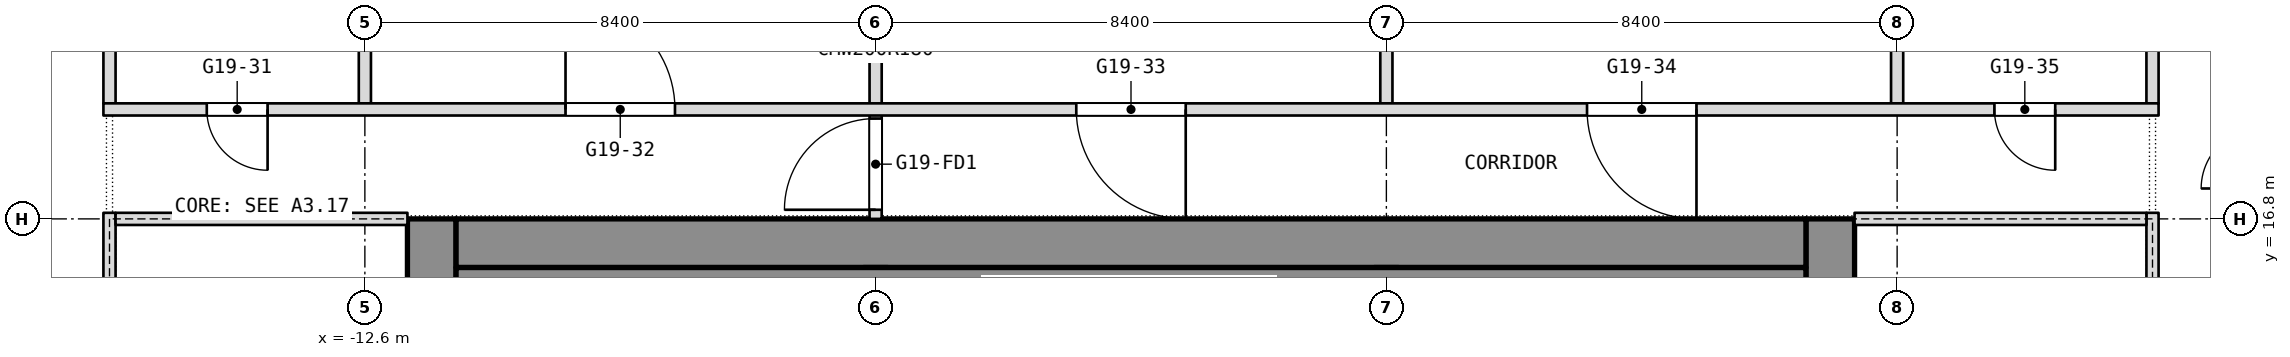
"""IFC4 building model, lengths in metres.
Left out: names, types, materials, properties, quantities, classifications, styles, units other than length and angle.
Written with IfcOpenShell. Run it as: python <this file> out.ifc"""

import sys

from ifc_helpers import new_model, si_unit, direction, frame, frame_2d, origin, place, context, subcontext, project, spatial, rectangle, extrude, element, fill, save


model = new_model("IFC4")
c1 = context("Model", 3, precision=1e-05, world=origin(), true_north=direction((0.0, 1.0)))
c2 = subcontext(c1, "Body", "Model", "MODEL_VIEW")
j1 = project(units=[si_unit("LENGTHUNIT", "METRE"), si_unit("PLANEANGLEUNIT", "RADIAN")], contexts=[c1])
p1 = place(None, origin())
s1 = spatial("IfcSite", under=j1, at=p1, CompositionType="ELEMENT")
p2 = place(p1, origin())
s2 = spatial("IfcBuilding", under=s1, at=p2, CompositionType="ELEMENT")
p3 = place(p2, frame((0.0, 0.0, 223.7)))
s3 = spatial("IfcBuildingStorey", under=s2, at=p3, CompositionType="ELEMENT", Elevation=223.7)
p4 = place(p3, frame((11.5, 0.0, 0.0), z_axis=(0.0, 0.0, 1.0), x_axis=(0.0, 1.0, 0.0)))
e1 = element("IfcWall", 1, at=p4, inside=s3, PredefinedType="SHEAR", context=c2, shape_type="SweptSolid", body=[
    extrude(rectangle(XDim=16.8, YDim=0.8, at=frame_2d((8.4, 0.0))), origin(), (0.0, 0.0, 1.0), 3.6),
])
p5 = place(p4, frame((2.3, 0.0, 0.0)))
e2 = element("IfcOpeningElement", 2, at=p5, cuts=e1, PredefinedType="OPENING", context=c2, shape_type="SweptSolid", body=[
    extrude(rectangle(XDim=1.1, YDim=2.1, at=frame_2d((0.55, 1.05))), frame((0.0, 0.4, 0.0), z_axis=(0.0, -1.0, 0.0), x_axis=(1.0, 0.0, 0.0)), (0.0, 0.0, 1.0), 0.8),
])
p6 = place(p4, frame((4.85, 0.0, 0.0)))
e3 = element("IfcOpeningElement", 3, at=p6, cuts=e1, PredefinedType="OPENING", context=c2, shape_type="SweptSolid", body=[
    extrude(rectangle(XDim=1.1, YDim=2.1, at=frame_2d((0.55, 1.05))), frame((0.0, 0.4, 0.0), z_axis=(0.0, -1.0, 0.0), x_axis=(1.0, 0.0, 0.0)), (0.0, 0.0, 1.0), 0.8),
])
p7 = place(p4, frame((6.825, 0.0, 0.0)))
e4 = element("IfcOpeningElement", 4, at=p7, cuts=e1, PredefinedType="OPENING", context=c2, shape_type="SweptSolid", body=[
    extrude(rectangle(XDim=1.2, YDim=2.1, at=frame_2d((0.6, 1.05))), frame((0.0, 0.4, 0.0), z_axis=(0.0, -1.0, 0.0), x_axis=(1.0, 0.0, 0.0)), (0.0, 0.0, 1.0), 0.8),
])
p8 = place(p4, frame((13.4, 0.0, 0.0)))
e5 = element("IfcOpeningElement", 5, at=p8, cuts=e1, PredefinedType="OPENING", context=c2, shape_type="SweptSolid", body=[
    extrude(rectangle(XDim=1.1, YDim=2.1, at=frame_2d((0.55, 1.05))), frame((0.0, 0.4, 0.0), z_axis=(0.0, -1.0, 0.0), x_axis=(1.0, 0.0, 0.0)), (0.0, 0.0, 1.0), 0.8),
])
p9 = place(p4, frame((10.85, 0.0, 0.0)))
e6 = element("IfcOpeningElement", 6, at=p9, cuts=e1, PredefinedType="OPENING", context=c2, shape_type="SweptSolid", body=[
    extrude(rectangle(XDim=1.1, YDim=2.1, at=frame_2d((0.55, 1.05))), frame((0.0, 0.4, 0.0), z_axis=(0.0, -1.0, 0.0), x_axis=(1.0, 0.0, 0.0)), (0.0, 0.0, 1.0), 0.8),
])
p10 = place(p4, frame((8.775, 0.0, 0.0)))
e7 = element("IfcOpeningElement", 7, at=p10, cuts=e1, PredefinedType="OPENING", context=c2, shape_type="SweptSolid", body=[
    extrude(rectangle(XDim=1.2, YDim=2.1, at=frame_2d((0.6, 1.05))), frame((0.0, 0.4, 0.0), z_axis=(0.0, -1.0, 0.0), x_axis=(1.0, 0.0, 0.0)), (0.0, 0.0, 1.0), 0.8),
])
p11 = place(p3, frame((-11.5, 0.0, 0.0), z_axis=(0.0, 0.0, 1.0), x_axis=(0.0, 1.0, 0.0)))
e8 = element("IfcWall", 8, at=p11, inside=s3, PredefinedType="SHEAR", context=c2, shape_type="SweptSolid", body=[
    extrude(rectangle(XDim=16.8, YDim=0.8, at=frame_2d((8.4, 0.0))), origin(), (0.0, 0.0, 1.0), 3.6),
])
p12 = place(p11, frame((1.688, 0.0, 0.0)))
e9 = element("IfcOpeningElement", 9, at=p12, cuts=e8, PredefinedType="OPENING", context=c2, shape_type="SweptSolid", body=[
    extrude(rectangle(XDim=0.9, YDim=2.1, at=frame_2d((0.45, 1.05))), frame((0.0, 0.4, 0.0), z_axis=(0.0, -1.0, 0.0), x_axis=(1.0, 0.0, 0.0)), (0.0, 0.0, 1.0), 0.8),
])
p13 = place(p11, frame((4.312, 0.0, 0.0)))
e10 = element("IfcOpeningElement", 10, at=p13, cuts=e8, PredefinedType="OPENING", context=c2, shape_type="SweptSolid", body=[
    extrude(rectangle(XDim=0.9, YDim=2.1, at=frame_2d((0.45, 1.05))), frame((0.0, 0.4, 0.0), z_axis=(0.0, -1.0, 0.0), x_axis=(1.0, 0.0, 0.0)), (0.0, 0.0, 1.0), 0.8),
])
p14 = place(p11, frame((6.825, 0.0, 0.0)))
e11 = element("IfcOpeningElement", 11, at=p14, cuts=e8, PredefinedType="OPENING", context=c2, shape_type="SweptSolid", body=[
    extrude(rectangle(XDim=1.2, YDim=2.1, at=frame_2d((0.6, 1.05))), frame((0.0, 0.4, 0.0), z_axis=(0.0, -1.0, 0.0), x_axis=(1.0, 0.0, 0.0)), (0.0, 0.0, 1.0), 0.8),
])
p15 = place(p11, frame((12.3, 0.0, 0.0)))
e12 = element("IfcOpeningElement", 12, at=p15, cuts=e8, PredefinedType="OPENING", context=c2, shape_type="SweptSolid", body=[
    extrude(rectangle(XDim=0.9, YDim=2.1, at=frame_2d((0.45, 1.05))), frame((0.0, 0.4, 0.0), z_axis=(0.0, -1.0, 0.0), x_axis=(1.0, 0.0, 0.0)), (0.0, 0.0, 1.0), 0.8),
])
p16 = place(p11, frame((8.775, 0.0, 0.0)))
e13 = element("IfcOpeningElement", 13, at=p16, cuts=e8, PredefinedType="OPENING", context=c2, shape_type="SweptSolid", body=[
    extrude(rectangle(XDim=1.2, YDim=2.1, at=frame_2d((0.6, 1.05))), frame((0.0, 0.4, 0.0), z_axis=(0.0, -1.0, 0.0), x_axis=(1.0, 0.0, 0.0)), (0.0, 0.0, 1.0), 0.8),
])
p17 = place(p3, frame((-11.1, 16.4, 0.0), z_axis=(0.0, 0.0, 1.0), x_axis=(1.0, 0.0, 0.0)))
e14 = element("IfcWall", 14, at=p17, inside=s3, PredefinedType="SHEAR", context=c2, shape_type="SweptSolid", body=[
    extrude(rectangle(XDim=22.2, YDim=0.8, at=frame_2d((11.1, 0.0))), origin(), (0.0, 0.0, 1.0), 3.6),
])
p18 = place(p3, frame((-4.2, 0.8, 0.0), z_axis=(0.0, 0.0, 1.0), x_axis=(0.0, 1.0, 0.0)))
e15 = element("IfcWall", 15, at=p18, inside=s3, PredefinedType="SHEAR", context=c2, shape_type="SweptSolid", body=[
    extrude(rectangle(XDim=15.2, YDim=0.4, at=frame_2d((7.6, 0.0))), origin(), (0.0, 0.0, 1.0), 3.6),
])
p19 = place(p18, frame((8.5, 0.0, 0.0)))
e16 = element("IfcOpeningElement", 16, at=p19, cuts=e15, PredefinedType="OPENING", context=c2, shape_type="SweptSolid", body=[
    extrude(rectangle(XDim=1.2, YDim=2.1, at=frame_2d((0.6, 1.05))), frame((0.0, 0.2, 0.0), z_axis=(0.0, -1.0, 0.0), x_axis=(1.0, 0.0, 0.0)), (0.0, 0.0, 1.0), 0.4),
])
p20 = place(p3, frame((4.2, 0.8, 0.0), z_axis=(0.0, 0.0, 1.0), x_axis=(0.0, 1.0, 0.0)))
e17 = element("IfcWall", 17, at=p20, inside=s3, PredefinedType="SHEAR", context=c2, shape_type="SweptSolid", body=[
    extrude(rectangle(XDim=15.2, YDim=0.4, at=frame_2d((7.6, 0.0))), origin(), (0.0, 0.0, 1.0), 3.6),
])
p21 = place(p20, frame((5.95, 0.0, 0.0)))
e18 = element("IfcOpeningElement", 18, at=p21, cuts=e17, PredefinedType="OPENING", context=c2, shape_type="SweptSolid", body=[
    extrude(rectangle(XDim=1.2, YDim=2.1, at=frame_2d((0.6, 1.05))), frame((0.0, 0.2, 0.0), z_axis=(0.0, -1.0, 0.0), x_axis=(1.0, 0.0, 0.0)), (0.0, 0.0, 1.0), 0.4),
])
for number, where, z_axis, x_axis in (
    (19, (16.8, 18.7, 0.0), (0.0, 0.0, 1.0), (0.0, 1.0, 0.0)),
    (20, (12.6, 18.7, 0.0), (0.0, 0.0, 1.0), (0.0, 1.0, 0.0)),
    (21, (4.2, 18.7, 0.0), (0.0, 0.0, 1.0), (0.0, 1.0, 0.0)),
):
    element("IfcWall", number, at=place(p3, frame(where, z_axis=z_axis, x_axis=x_axis)), inside=s3, PredefinedType="PARTITIONING", context=c2, shape_type="SweptSolid", body=[
        extrude(rectangle(XDim=3.64, YDim=0.2, at=frame_2d((1.82, 0.0))), origin(), (0.0, 0.0, 1.0), 3.34),
    ])
p22 = place(p3, frame((-4.2, 16.8, 0.0), z_axis=(0.0, 0.0, 1.0), x_axis=(0.0, 1.0, 0.0)))
e22 = element("IfcWall", 22, at=p22, inside=s3, PredefinedType="PARTITIONING", context=c2, shape_type="SweptSolid", body=[
    extrude(rectangle(XDim=5.54, YDim=0.2, at=frame_2d((2.77, 0.0))), origin(), (0.0, 0.0, 1.0), 3.34),
])
p23 = place(p22, frame((0.15, 0.0, 0.0)))
e23 = element("IfcOpeningElement", 23, at=p23, cuts=e22, PredefinedType="OPENING", context=c2, shape_type="SweptSolid", body=[
    extrude(rectangle(XDim=1.5, YDim=2.1, at=frame_2d((0.75, 1.05))), frame((0.0, 0.1, 0.0), z_axis=(0.0, -1.0, 0.0), x_axis=(1.0, 0.0, 0.0)), (0.0, 0.0, 1.0), 0.2),
])
for number, where, z_axis, x_axis in (
    (24, (-12.6, 18.7, 0.0), (0.0, 0.0, 1.0), (0.0, 1.0, 0.0)),
    (25, (-16.8, 18.7, 0.0), (0.0, 0.0, 1.0), (0.0, 1.0, 0.0)),
):
    element("IfcWall", number, at=place(p3, frame(where, z_axis=z_axis, x_axis=x_axis)), inside=s3, PredefinedType="PARTITIONING", context=c2, shape_type="SweptSolid", body=[
        extrude(rectangle(XDim=3.64, YDim=0.2, at=frame_2d((1.82, 0.0))), origin(), (0.0, 0.0, 1.0), 3.34),
    ])
p24 = place(p3, frame((-16.9, 18.6, 0.0), z_axis=(0.0, 0.0, 1.0), x_axis=(1.0, 0.0, 0.0)))
e26 = element("IfcWall", 26, at=p24, inside=s3, PredefinedType="PARTITIONING", context=c2, shape_type="SweptSolid", body=[
    extrude(rectangle(XDim=33.8, YDim=0.2, at=frame_2d((16.9, 0.0))), origin(), (0.0, 0.0, 1.0), 3.34),
])
p25 = place(p24, frame((1.7, 0.0, 0.0)))
e27 = element("IfcOpeningElement", 27, at=p25, cuts=e26, PredefinedType="OPENING", context=c2, shape_type="SweptSolid", body=[
    extrude(rectangle(XDim=1.0, YDim=2.1, at=frame_2d((0.5, 1.05))), frame((0.0, 0.1, 0.0), z_axis=(0.0, -1.0, 0.0), x_axis=(1.0, 0.0, 0.0)), (0.0, 0.0, 1.0), 0.2),
])
p26 = place(p24, frame((7.6, 0.0, 0.0)))
e28 = element("IfcOpeningElement", 28, at=p26, cuts=e26, PredefinedType="OPENING", context=c2, shape_type="SweptSolid", body=[
    extrude(rectangle(XDim=1.8, YDim=2.1, at=frame_2d((0.9, 1.05))), frame((0.0, 0.1, 0.0), z_axis=(0.0, -1.0, 0.0), x_axis=(1.0, 0.0, 0.0)), (0.0, 0.0, 1.0), 0.2),
])
p27 = place(p24, frame((16.0, 0.0, 0.0)))
e29 = element("IfcOpeningElement", 29, at=p27, cuts=e26, PredefinedType="OPENING", context=c2, shape_type="SweptSolid", body=[
    extrude(rectangle(XDim=1.8, YDim=2.1, at=frame_2d((0.9, 1.05))), frame((0.0, 0.1, 0.0), z_axis=(0.0, -1.0, 0.0), x_axis=(1.0, 0.0, 0.0)), (0.0, 0.0, 1.0), 0.2),
])
p28 = place(p24, frame((24.4, 0.0, 0.0)))
e30 = element("IfcOpeningElement", 30, at=p28, cuts=e26, PredefinedType="OPENING", context=c2, shape_type="SweptSolid", body=[
    extrude(rectangle(XDim=1.8, YDim=2.1, at=frame_2d((0.9, 1.05))), frame((0.0, 0.1, 0.0), z_axis=(0.0, -1.0, 0.0), x_axis=(1.0, 0.0, 0.0)), (0.0, 0.0, 1.0), 0.2),
])
p29 = place(p24, frame((31.1, 0.0, 0.0)))
e31 = element("IfcOpeningElement", 31, at=p29, cuts=e26, PredefinedType="OPENING", context=c2, shape_type="SweptSolid", body=[
    extrude(rectangle(XDim=1.0, YDim=2.1, at=frame_2d((0.5, 1.05))), frame((0.0, 0.1, 0.0), z_axis=(0.0, -1.0, 0.0), x_axis=(1.0, 0.0, 0.0)), (0.0, 0.0, 1.0), 0.2),
])
p30 = place(p3, frame((-11.1, 15.65, 0.0), z_axis=(0.0, 0.0, 1.0), x_axis=(1.0, 0.0, 0.0)))
e32 = element("IfcWall", 32, at=p30, inside=s3, PredefinedType="PARTITIONING", context=c2, shape_type="SweptSolid", body=[
    extrude(rectangle(XDim=22.2, YDim=0.7, at=frame_2d((11.1, 0.0))), origin(), (0.0, 0.0, 1.0), 3.34),
])
p31 = place(p3, frame((-16.8, -0.1, 0.0), z_axis=(0.0, 0.0, 1.0), x_axis=(0.0, 1.0, 0.0)))
e33 = element("IfcWall", 33, at=p31, inside=s3, PredefinedType="PARTITIONING", context=c2, shape_type="SweptSolid", body=[
    extrude(rectangle(XDim=17.0, YDim=0.2, at=frame_2d((8.5, 0.0))), origin(), (0.0, 0.0, 1.0), 3.34),
])
p32 = place(p31, frame((2.2, 0.0, 0.0)))
e34 = element("IfcOpeningElement", 34, at=p32, cuts=e33, PredefinedType="OPENING", context=c2, shape_type="SweptSolid", body=[
    extrude(rectangle(XDim=1.8, YDim=2.1, at=frame_2d((0.9, 1.05))), frame((0.0, 0.1, 0.0), z_axis=(0.0, -1.0, 0.0), x_axis=(1.0, 0.0, 0.0)), (0.0, 0.0, 1.0), 0.2),
])
p33 = place(p31, frame((13.0, 0.0, 0.0)))
e35 = element("IfcOpeningElement", 35, at=p33, cuts=e33, PredefinedType="OPENING", context=c2, shape_type="SweptSolid", body=[
    extrude(rectangle(XDim=1.8, YDim=2.1, at=frame_2d((0.9, 1.05))), frame((0.0, 0.1, 0.0), z_axis=(0.0, -1.0, 0.0), x_axis=(1.0, 0.0, 0.0)), (0.0, 0.0, 1.0), 0.2),
])
p34 = place(p3, frame((-16.7, 16.8, 0.0), z_axis=(0.0, 0.0, 1.0), x_axis=(1.0, 0.0, 0.0)))
e36 = element("IfcWall", 36, at=p34, inside=s3, PredefinedType="PARTITIONING", context=c2, shape_type="SweptSolid", body=[
    extrude(rectangle(XDim=4.8, YDim=0.2, at=frame_2d((2.4, 0.0))), origin(), (0.0, 0.0, 1.0), 2.94),
])
p35 = place(p3, frame((16.8, -0.1, 0.0), z_axis=(0.0, 0.0, 1.0), x_axis=(0.0, 1.0, 0.0)))
e37 = element("IfcWall", 37, at=p35, inside=s3, PredefinedType="PARTITIONING", context=c2, shape_type="SweptSolid", body=[
    extrude(rectangle(XDim=17.0, YDim=0.2, at=frame_2d((8.5, 0.0))), origin(), (0.0, 0.0, 1.0), 3.34),
])
p36 = place(p35, frame((2.2, 0.0, 0.0)))
e38 = element("IfcOpeningElement", 38, at=p36, cuts=e37, PredefinedType="OPENING", context=c2, shape_type="SweptSolid", body=[
    extrude(rectangle(XDim=1.8, YDim=2.1, at=frame_2d((0.9, 1.05))), frame((0.0, 0.1, 0.0), z_axis=(0.0, -1.0, 0.0), x_axis=(1.0, 0.0, 0.0)), (0.0, 0.0, 1.0), 0.2),
])
p37 = place(p35, frame((13.0, 0.0, 0.0)))
e39 = element("IfcOpeningElement", 39, at=p37, cuts=e37, PredefinedType="OPENING", context=c2, shape_type="SweptSolid", body=[
    extrude(rectangle(XDim=1.8, YDim=2.1, at=frame_2d((0.9, 1.05))), frame((0.0, 0.1, 0.0), z_axis=(0.0, -1.0, 0.0), x_axis=(1.0, 0.0, 0.0)), (0.0, 0.0, 1.0), 0.2),
])
p38 = place(p3, frame((11.9, 16.8, 0.0), z_axis=(0.0, 0.0, 1.0), x_axis=(1.0, 0.0, 0.0)))
e40 = element("IfcWall", 40, at=p38, inside=s3, PredefinedType="PARTITIONING", context=c2, shape_type="SweptSolid", body=[
    extrude(rectangle(XDim=4.8, YDim=0.2, at=frame_2d((2.4, 0.0))), origin(), (0.0, 0.0, 1.0), 2.94),
])
p39 = place(p25, origin())
e41 = element("IfcDoor", 41, at=p39, inside=s3, OperationType="SINGLE_SWING_LEFT", PredefinedType="DOOR", context=c2, shape_type="SweptSolid", body=[
    extrude(rectangle(XDim=1.0, YDim=2.1, at=frame_2d((0.5, 1.05))), frame((0.0, 0.025, 0.0), z_axis=(0.0, -1.0, 0.0), x_axis=(1.0, 0.0, 0.0)), (0.0, 0.0, 1.0), 0.05),
])
fill(e27, e41)
p40 = place(p26, origin())
e42 = element("IfcDoor", 42, at=p40, inside=s3, OperationType="DOUBLE_DOOR_SINGLE_SWING", PredefinedType="DOOR", context=c2, shape_type="SweptSolid", body=[
    extrude(rectangle(XDim=1.8, YDim=2.1, at=frame_2d((0.9, 1.05))), frame((0.0, 0.025, 0.0), z_axis=(0.0, -1.0, 0.0), x_axis=(1.0, 0.0, 0.0)), (0.0, 0.0, 1.0), 0.05),
])
fill(e28, e42)
p41 = place(p27, origin())
e43 = element("IfcDoor", 43, at=p41, inside=s3, OperationType="DOUBLE_DOOR_SINGLE_SWING", PredefinedType="DOOR", context=c2, shape_type="SweptSolid", body=[
    extrude(rectangle(XDim=1.8, YDim=2.1, at=frame_2d((0.9, 1.05))), frame((0.0, 0.025, 0.0), z_axis=(0.0, -1.0, 0.0), x_axis=(1.0, 0.0, 0.0)), (0.0, 0.0, 1.0), 0.05),
])
fill(e29, e43)
p42 = place(p28, origin())
e44 = element("IfcDoor", 44, at=p42, inside=s3, OperationType="DOUBLE_DOOR_SINGLE_SWING", PredefinedType="DOOR", context=c2, shape_type="SweptSolid", body=[
    extrude(rectangle(XDim=1.8, YDim=2.1, at=frame_2d((0.9, 1.05))), frame((0.0, 0.025, 0.0), z_axis=(0.0, -1.0, 0.0), x_axis=(1.0, 0.0, 0.0)), (0.0, 0.0, 1.0), 0.05),
])
fill(e30, e44)
p43 = place(p29, origin())
e45 = element("IfcDoor", 45, at=p43, inside=s3, OperationType="SINGLE_SWING_LEFT", PredefinedType="DOOR", context=c2, shape_type="SweptSolid", body=[
    extrude(rectangle(XDim=1.0, YDim=2.1, at=frame_2d((0.5, 1.05))), frame((0.0, 0.025, 0.0), z_axis=(0.0, -1.0, 0.0), x_axis=(1.0, 0.0, 0.0)), (0.0, 0.0, 1.0), 0.05),
])
fill(e31, e45)
p44 = place(p23, origin())
e46 = element("IfcDoor", 46, at=p44, inside=s3, OperationType="DOUBLE_DOOR_DOUBLE_SWING", PredefinedType="DOOR", context=c2, shape_type="SweptSolid", body=[
    extrude(rectangle(XDim=1.5, YDim=2.1, at=frame_2d((0.75, 1.05))), frame((0.0, 0.025, 0.0), z_axis=(0.0, -1.0, 0.0), x_axis=(1.0, 0.0, 0.0)), (0.0, 0.0, 1.0), 0.05),
])
fill(e23, e46)
save(model, sys.argv[1])
